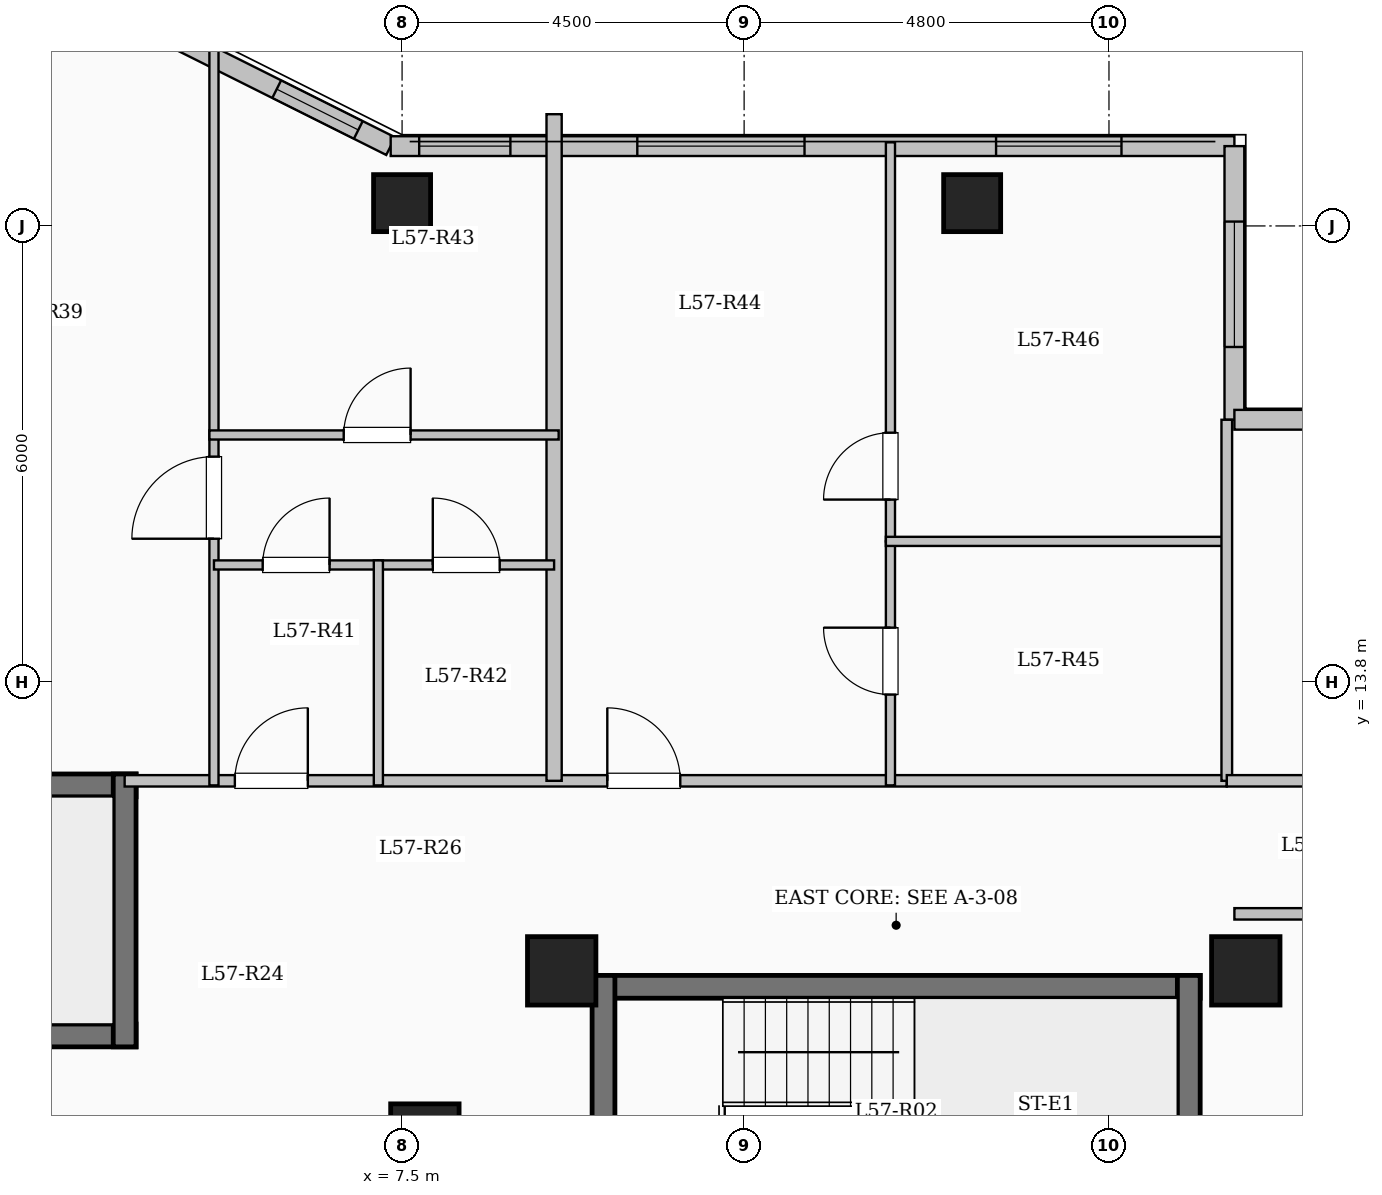
"""IFC4 building model, lengths in metres.
Left out: names, types, materials, properties, quantities, classifications, styles, units other than length and angle.
Written with IfcOpenShell. Run it as: python <this file> out.ifc"""

import sys

from ifc_helpers import new_model, si_unit, direction, frame, frame_2d, origin, origin_2d, place, context, subcontext, project, spatial, rectangle, extrude, element, fill, save


model = new_model("IFC4")
c1 = context("Model", 3, precision=1e-05, world=origin(), true_north=direction((0.0, 1.0)))
c2 = subcontext(c1, "Body", "Model", "MODEL_VIEW")
j1 = project(units=[si_unit("LENGTHUNIT", "METRE"), si_unit("PLANEANGLEUNIT", "RADIAN")], contexts=[c1])
p1 = place(None, origin())
s1 = spatial("IfcSite", under=j1, at=p1, CompositionType="ELEMENT")
p2 = place(p1, origin())
s2 = spatial("IfcBuilding", under=s1, at=p2, CompositionType="ELEMENT")
p3 = place(p2, frame((0.0, 0.0, 210.35)))
s3 = spatial("IfcBuildingStorey", under=s2, at=p3, CompositionType="ELEMENT", Elevation=210.35)
for number, where, z_axis, x_axis in (
    (1, (7.8, 7.8, 0.0), (0.0, 0.0, 1.0), (1.0, 0.0, 0.0)),
    (2, (9.6, 10.0, 0.0), (0.0, 0.0, 1.0), (1.0, 0.0, 0.0)),
    (3, (18.6, 10.0, 0.0), (0.0, 0.0, 1.0), (1.0, 0.0, 0.0)),
):
    element("IfcColumn", number, at=place(p3, frame(where, z_axis=z_axis, x_axis=x_axis)), inside=s3, PredefinedType="COLUMN", context=c2, shape_type="SweptSolid", body=[
        extrude(rectangle(XDim=0.9, YDim=0.9, at=origin_2d()), origin(), (0.0, 0.0, 1.0), 3.35),
    ])
for number, where, z_axis, x_axis in (
    (4, (7.5, 20.1, 0.0), (0.0, 0.0, 1.0), (1.0, 0.0, 0.0)),
    (5, (15.0, 20.1, 0.0), (0.0, 0.0, 1.0), (1.0, 0.0, 0.0)),
):
    element("IfcColumn", number, at=place(p3, frame(where, z_axis=z_axis, x_axis=x_axis)), inside=s3, PredefinedType="COLUMN", context=c2, shape_type="SweptSolid", body=[
        extrude(rectangle(XDim=0.75, YDim=0.75, at=origin_2d()), origin(), (0.0, 0.0, 1.0), 3.35),
    ])
p4 = place(p3, frame((4.35, 22.35, 0.0), z_axis=(0.0, 0.0, 1.0), x_axis=(0.894427191, -0.4472135955, 0.0)))
e6 = element("IfcWall", 6, at=p4, inside=s3, PredefinedType="SOLIDWALL", context=c2, shape_type="SweptSolid", body=[
    extrude(rectangle(XDim=3.354, YDim=0.26, at=frame_2d((1.677, 0.0))), origin(), (0.0, 0.0, 1.0), 3.1),
])
p5 = place(p4, frame((1.678, 0.0, 0.95)))
e7 = element("IfcOpeningElement", 7, at=p5, cuts=e6, PredefinedType="OPENING", context=c2, shape_type="SweptSolid", body=[
    extrude(rectangle(XDim=1.2, YDim=1.5, at=frame_2d((0.6, 0.75))), frame((0.0, 0.14, 0.0), z_axis=(0.0, -1.0, 0.0), x_axis=(1.0, 0.0, 0.0)), (0.0, 0.0, 1.0), 0.28),
])
p6 = place(p3, frame((7.35, 20.85, 0.0), z_axis=(0.0, 0.0, 1.0), x_axis=(1.0, 0.0, 0.0)))
e8 = element("IfcWall", 8, at=p6, inside=s3, PredefinedType="SOLIDWALL", context=c2, shape_type="SweptSolid", body=[
    extrude(rectangle(XDim=11.1, YDim=0.26, at=frame_2d((5.55, 0.0))), origin(), (0.0, 0.0, 1.0), 3.1),
])
p7 = place(p6, frame((0.375, 0.0, 0.95)))
e9 = element("IfcOpeningElement", 9, at=p7, cuts=e8, PredefinedType="OPENING", context=c2, shape_type="SweptSolid", body=[
    extrude(rectangle(XDim=1.2, YDim=1.5, at=frame_2d((0.6, 0.75))), frame((0.0, 0.14, 0.0), z_axis=(0.0, -1.0, 0.0), x_axis=(1.0, 0.0, 0.0)), (0.0, 0.0, 1.0), 0.28),
])
p8 = place(p6, frame((3.245, 0.0, 0.9)))
e10 = element("IfcOpeningElement", 10, at=p8, cuts=e8, PredefinedType="OPENING", context=c2, shape_type="SweptSolid", body=[
    extrude(rectangle(XDim=2.2, YDim=1.75, at=frame_2d((1.1, 0.875))), frame((0.0, 0.14, 0.0), z_axis=(0.0, -1.0, 0.0), x_axis=(1.0, 0.0, 0.0)), (0.0, 0.0, 1.0), 0.28),
])
p9 = place(p6, frame((7.965, 0.0, 0.9)))
e11 = element("IfcOpeningElement", 11, at=p9, cuts=e8, PredefinedType="OPENING", context=c2, shape_type="SweptSolid", body=[
    extrude(rectangle(XDim=1.65, YDim=1.6, at=frame_2d((0.825, 0.8))), frame((0.0, 0.14, 0.0), z_axis=(0.0, -1.0, 0.0), x_axis=(1.0, 0.0, 0.0)), (0.0, 0.0, 1.0), 0.28),
])
p10 = place(p3, frame((18.45, 20.85, 0.0), z_axis=(0.0, 0.0, 1.0), x_axis=(0.0, -1.0, 0.0)))
e12 = element("IfcWall", 12, at=p10, inside=s3, PredefinedType="SOLIDWALL", context=c2, shape_type="SweptSolid", body=[
    extrude(rectangle(XDim=3.6, YDim=0.26, at=frame_2d((1.8, 0.0))), origin(), (0.0, 0.0, 1.0), 3.1),
])
p11 = place(p10, frame((0.992, 0.0, 0.9)))
e13 = element("IfcOpeningElement", 13, at=p11, cuts=e12, PredefinedType="OPENING", context=c2, shape_type="SweptSolid", body=[
    extrude(rectangle(XDim=1.65, YDim=1.6, at=frame_2d((0.825, 0.8))), frame((0.0, 0.14, 0.0), z_axis=(0.0, -1.0, 0.0), x_axis=(1.0, 0.0, 0.0)), (0.0, 0.0, 1.0), 0.28),
])
p12 = place(p3, frame((18.45, 17.25, 0.0), z_axis=(0.0, 0.0, 1.0), x_axis=(1.0, 0.0, 0.0)))
e14 = element("IfcWall", 14, at=p12, inside=s3, PredefinedType="SOLIDWALL", context=c2, shape_type="SweptSolid", body=[
    extrude(rectangle(XDim=5.1, YDim=0.26, at=frame_2d((2.55, 0.0))), origin(), (0.0, 0.0, 1.0), 3.1),
])
p13 = place(p12, frame((1.525, 0.0, 0.9)))
e15 = element("IfcOpeningElement", 15, at=p13, cuts=e14, PredefinedType="OPENING", context=c2, shape_type="SweptSolid", body=[
    extrude(rectangle(XDim=2.0, YDim=1.7, at=frame_2d((1.0, 0.85))), frame((0.0, 0.14, 0.0), z_axis=(0.0, -1.0, 0.0), x_axis=(1.0, 0.0, 0.0)), (0.0, 0.0, 1.0), 0.28),
])
p14 = place(p3, frame((10.0, 9.79, 0.0), z_axis=(0.0, 0.0, 1.0), x_axis=(1.0, 0.0, 0.0)))
e16 = element("IfcWall", 16, at=p14, inside=s3, PredefinedType="SHEAR", context=c2, shape_type="SweptSolid", body=[
    extrude(rectangle(XDim=8.0, YDim=0.3, at=frame_2d((4.0, 0.0))), origin(), (0.0, 0.0, 1.0), 3.35),
])
for number, where, z_axis, x_axis in (
    (17, (10.15, 6.35, 0.0), (0.0, 0.0, 1.0), (0.0, 1.0, 0.0)),
    (18, (17.85, 6.35, 0.0), (0.0, 0.0, 1.0), (0.0, 1.0, 0.0)),
):
    element("IfcWall", number, at=place(p3, frame(where, z_axis=z_axis, x_axis=x_axis)), inside=s3, PredefinedType="SHEAR", context=c2, shape_type="SweptSolid", body=[
        extrude(rectangle(XDim=3.59, YDim=0.3, at=frame_2d((1.795, 0.0))), origin(), (0.0, 0.0, 1.0), 3.35),
    ])
p15 = place(p3, frame((-4.0, 12.44, 0.0), z_axis=(0.0, 0.0, 1.0), x_axis=(1.0, 0.0, 0.0)))
e19 = element("IfcWall", 19, at=p15, inside=s3, PredefinedType="SHEAR", context=c2, shape_type="SweptSolid", body=[
    extrude(rectangle(XDim=8.0, YDim=0.3, at=frame_2d((4.0, 0.0))), origin(), (0.0, 0.0, 1.0), 3.35),
])
p16 = place(p3, frame((-4.0, 9.15, 0.0), z_axis=(0.0, 0.0, 1.0), x_axis=(1.0, 0.0, 0.0)))
e20 = element("IfcWall", 20, at=p16, inside=s3, PredefinedType="SHEAR", context=c2, shape_type="SweptSolid", body=[
    extrude(rectangle(XDim=8.0, YDim=0.3, at=frame_2d((4.0, 0.0))), origin(), (0.0, 0.0, 1.0), 3.35),
])
p17 = place(p16, frame((0.55, 0.0, 0.0)))
e21 = element("IfcOpeningElement", 21, at=p17, cuts=e20, PredefinedType="OPENING", context=c2, shape_type="SweptSolid", body=[
    extrude(rectangle(XDim=1.0, YDim=2.15, at=frame_2d((0.5, 1.075))), frame((0.0, 0.16, 0.0), z_axis=(0.0, -1.0, 0.0), x_axis=(1.0, 0.0, 0.0)), (0.0, 0.0, 1.0), 0.32),
])
p18 = place(p3, frame((3.85, 9.0, 0.0), z_axis=(0.0, 0.0, 1.0), x_axis=(0.0, 1.0, 0.0)))
e22 = element("IfcWall", 22, at=p18, inside=s3, PredefinedType="SHEAR", context=c2, shape_type="SweptSolid", body=[
    extrude(rectangle(XDim=3.59, YDim=0.3, at=frame_2d((1.795, 0.0))), origin(), (0.0, 0.0, 1.0), 3.35),
])
p19 = place(p3, frame((3.85, 12.5, 0.0), z_axis=(0.0, 0.0, 1.0), x_axis=(1.0, 0.0, 0.0)))
e23 = element("IfcWall", 23, at=p19, inside=s3, PredefinedType="PARTITIONING", context=c2, shape_type="SweptSolid", body=[
    extrude(rectangle(XDim=14.5, YDim=0.15, at=frame_2d((7.25, 0.0))), origin(), (0.0, 0.0, 1.0), 3.1),
])
p20 = place(p19, frame((1.45, 0.0, 0.0)))
e24 = element("IfcOpeningElement", 24, at=p20, cuts=e23, PredefinedType="OPENING", context=c2, shape_type="SweptSolid", body=[
    extrude(rectangle(XDim=0.96, YDim=2.15, at=frame_2d((0.48, 1.075))), frame((0.0, 0.085, 0.0), z_axis=(0.0, -1.0, 0.0), x_axis=(1.0, 0.0, 0.0)), (0.0, 0.0, 1.0), 0.17),
])
p21 = place(p19, frame((6.35, 0.0, 0.0)))
e25 = element("IfcOpeningElement", 25, at=p21, cuts=e23, PredefinedType="OPENING", context=c2, shape_type="SweptSolid", body=[
    extrude(rectangle(XDim=0.96, YDim=2.15, at=frame_2d((0.48, 1.075))), frame((0.0, 0.085, 0.0), z_axis=(0.0, -1.0, 0.0), x_axis=(1.0, 0.0, 0.0)), (0.0, 0.0, 1.0), 0.17),
])
p22 = place(p3, frame((9.5, 12.5, 0.0), z_axis=(0.0, 0.0, 1.0), x_axis=(0.0, 1.0, 0.0)))
e26 = element("IfcWall", 26, at=p22, inside=s3, PredefinedType="SOLIDWALL", context=c2, shape_type="SweptSolid", body=[
    extrude(rectangle(XDim=8.77, YDim=0.2, at=frame_2d((4.385, 0.0))), origin(), (0.0, 0.0, 1.0), 3.1),
])
p23 = place(p3, frame((5.025, 12.44, 0.0), z_axis=(0.0, 0.0, 1.0), x_axis=(0.0, 1.0, 0.0)))
e27 = element("IfcWall", 27, at=p23, inside=s3, PredefinedType="PARTITIONING", context=c2, shape_type="SweptSolid", body=[
    extrude(rectangle(XDim=9.934, YDim=0.12, at=frame_2d((4.967, 0.0))), origin(), (0.0, 0.0, 1.0), 3.1),
])
p24 = place(p23, frame((3.245, 0.0, 0.0)))
e28 = element("IfcOpeningElement", 28, at=p24, cuts=e27, PredefinedType="OPENING", context=c2, shape_type="SweptSolid", body=[
    extrude(rectangle(XDim=1.08, YDim=2.15, at=frame_2d((0.54, 1.075))), frame((0.0, 0.07, 0.0), z_axis=(0.0, -1.0, 0.0), x_axis=(1.0, 0.0, 0.0)), (0.0, 0.0, 1.0), 0.14),
])
p25 = place(p3, frame((5.025, 15.34, 0.0), z_axis=(0.0, 0.0, 1.0), x_axis=(1.0, 0.0, 0.0)))
e29 = element("IfcWall", 29, at=p25, inside=s3, PredefinedType="PARTITIONING", context=c2, shape_type="SweptSolid", body=[
    extrude(rectangle(XDim=2.163, YDim=0.12, at=frame_2d((1.082, 0.0))), origin(), (0.0, 0.0, 1.0), 2.725),
])
p26 = place(p25, frame((0.641, 0.0, 0.0)))
e30 = element("IfcOpeningElement", 30, at=p26, cuts=e29, PredefinedType="OPENING", context=c2, shape_type="SweptSolid", body=[
    extrude(rectangle(XDim=0.88, YDim=2.1, at=frame_2d((0.44, 1.05))), frame((0.0, 0.07, 0.0), z_axis=(0.0, -1.0, 0.0), x_axis=(1.0, 0.0, 0.0)), (0.0, 0.0, 1.0), 0.14),
])
p27 = place(p3, frame((7.188, 15.34, 0.0), z_axis=(0.0, 0.0, 1.0), x_axis=(1.0, 0.0, 0.0)))
e31 = element("IfcWall", 31, at=p27, inside=s3, PredefinedType="PARTITIONING", context=c2, shape_type="SweptSolid", body=[
    extrude(rectangle(XDim=2.312, YDim=0.12, at=frame_2d((1.156, 0.0))), origin(), (0.0, 0.0, 1.0), 2.725),
])
p28 = place(p27, frame((0.716, 0.0, 0.0)))
e32 = element("IfcOpeningElement", 32, at=p28, cuts=e31, PredefinedType="OPENING", context=c2, shape_type="SweptSolid", body=[
    extrude(rectangle(XDim=0.88, YDim=2.1, at=frame_2d((0.44, 1.05))), frame((0.0, 0.07, 0.0), z_axis=(0.0, -1.0, 0.0), x_axis=(1.0, 0.0, 0.0)), (0.0, 0.0, 1.0), 0.14),
])
p29 = place(p3, frame((4.965, 17.05, 0.0), z_axis=(0.0, 0.0, 1.0), x_axis=(1.0, 0.0, 0.0)))
e33 = element("IfcWall", 33, at=p29, inside=s3, PredefinedType="PARTITIONING", context=c2, shape_type="SweptSolid", body=[
    extrude(rectangle(XDim=4.595, YDim=0.12, at=frame_2d((2.297, 0.0))), origin(), (0.0, 0.0, 1.0), 2.725),
])
p30 = place(p29, frame((1.767, 0.0, 0.0)))
e34 = element("IfcOpeningElement", 34, at=p30, cuts=e33, PredefinedType="OPENING", context=c2, shape_type="SweptSolid", body=[
    extrude(rectangle(XDim=0.88, YDim=2.1, at=frame_2d((0.44, 1.05))), frame((0.0, 0.07, 0.0), z_axis=(0.0, -1.0, 0.0), x_axis=(1.0, 0.0, 0.0)), (0.0, 0.0, 1.0), 0.14),
])
p31 = place(p3, frame((7.188, 12.44, 0.0), z_axis=(0.0, 0.0, 1.0), x_axis=(0.0, 1.0, 0.0)))
e35 = element("IfcWall", 35, at=p31, inside=s3, PredefinedType="PARTITIONING", context=c2, shape_type="SweptSolid", body=[
    extrude(rectangle(XDim=2.96, YDim=0.12, at=frame_2d((1.48, 0.0))), origin(), (0.0, 0.0, 1.0), 2.585),
])
p32 = place(p3, frame((13.925, 12.44, 0.0), z_axis=(0.0, 0.0, 1.0), x_axis=(0.0, 1.0, 0.0)))
e36 = element("IfcWall", 36, at=p32, inside=s3, PredefinedType="PARTITIONING", context=c2, shape_type="SweptSolid", body=[
    extrude(rectangle(XDim=3.21, YDim=0.12, at=frame_2d((1.605, 0.0))), origin(), (0.0, 0.0, 1.0), 3.1),
])
p33 = place(p32, frame((1.195, 0.0, 0.0)))
e37 = element("IfcOpeningElement", 37, at=p33, cuts=e36, PredefinedType="OPENING", context=c2, shape_type="SweptSolid", body=[
    extrude(rectangle(XDim=0.88, YDim=2.1, at=frame_2d((0.44, 1.05))), frame((0.0, 0.07, 0.0), z_axis=(0.0, -1.0, 0.0), x_axis=(1.0, 0.0, 0.0)), (0.0, 0.0, 1.0), 0.14),
])
p34 = place(p3, frame((13.925, 15.65, 0.0), z_axis=(0.0, 0.0, 1.0), x_axis=(0.0, 1.0, 0.0)))
e38 = element("IfcWall", 38, at=p34, inside=s3, PredefinedType="PARTITIONING", context=c2, shape_type="SweptSolid", body=[
    extrude(rectangle(XDim=5.25, YDim=0.12, at=frame_2d((2.625, 0.0))), origin(), (0.0, 0.0, 1.0), 3.1),
])
p35 = place(p34, frame((0.55, 0.0, 0.0)))
e39 = element("IfcOpeningElement", 39, at=p35, cuts=e38, PredefinedType="OPENING", context=c2, shape_type="SweptSolid", body=[
    extrude(rectangle(XDim=0.88, YDim=2.1, at=frame_2d((0.44, 1.05))), frame((0.0, 0.07, 0.0), z_axis=(0.0, -1.0, 0.0), x_axis=(1.0, 0.0, 0.0)), (0.0, 0.0, 1.0), 0.14),
])
p36 = place(p3, frame((13.865, 15.65, 0.0), z_axis=(0.0, 0.0, 1.0), x_axis=(1.0, 0.0, 0.0)))
e40 = element("IfcWall", 40, at=p36, inside=s3, PredefinedType="PARTITIONING", context=c2, shape_type="SweptSolid", body=[
    extrude(rectangle(XDim=4.545, YDim=0.12, at=frame_2d((2.272, 0.0))), origin(), (0.0, 0.0, 1.0), 2.725),
])
p37 = place(p3, frame((18.45, 10.75, 0.0), z_axis=(0.0, 0.0, 1.0), x_axis=(1.0, 0.0, 0.0)))
e41 = element("IfcWall", 41, at=p37, inside=s3, PredefinedType="PARTITIONING", context=c2, shape_type="SweptSolid", body=[
    extrude(rectangle(XDim=5.13, YDim=0.15, at=frame_2d((2.565, 0.0))), origin(), (0.0, 0.0, 1.0), 3.1),
])
p38 = place(p3, frame((18.35, 12.5, 0.0), z_axis=(0.0, 0.0, 1.0), x_axis=(0.0, 1.0, 0.0)))
e42 = element("IfcWall", 42, at=p38, inside=s3, PredefinedType="PARTITIONING", context=c2, shape_type="SweptSolid", body=[
    extrude(rectangle(XDim=4.75, YDim=0.14, at=frame_2d((2.375, 0.0))), origin(), (0.0, 0.0, 1.0), 3.1),
])
p39 = place(p3, frame((18.35, 12.5, 0.0), z_axis=(0.0, 0.0, 1.0), x_axis=(1.0, 0.0, 0.0)))
e43 = element("IfcWall", 43, at=p39, inside=s3, PredefinedType="PARTITIONING", context=c2, shape_type="SweptSolid", body=[
    extrude(rectangle(XDim=5.23, YDim=0.15, at=frame_2d((2.615, 0.0))), origin(), (0.0, 0.0, 1.0), 3.1),
])
p40 = place(p39, frame((2.14, 0.0, 0.0)))
e44 = element("IfcOpeningElement", 44, at=p40, cuts=e43, PredefinedType="OPENING", context=c2, shape_type="SweptSolid", body=[
    extrude(rectangle(XDim=0.95, YDim=2.15, at=frame_2d((0.475, 1.075))), frame((0.0, 0.085, 0.0), z_axis=(0.0, -1.0, 0.0), x_axis=(1.0, 0.0, 0.0)), (0.0, 0.0, 1.0), 0.17),
])
p41 = place(p5, origin())
e45 = element("IfcWindow", 45, at=p41, inside=s3, PartitioningType="SINGLE_PANEL", PredefinedType="WINDOW", context=c2, shape_type="SweptSolid", body=[
    extrude(rectangle(XDim=1.2, YDim=1.5, at=frame_2d((0.6, 0.75))), frame((0.0, 0.03, 0.0), z_axis=(0.0, -1.0, 0.0), x_axis=(1.0, 0.0, 0.0)), (0.0, 0.0, 1.0), 0.06),
])
fill(e7, e45)
p42 = place(p7, origin())
e46 = element("IfcWindow", 46, at=p42, inside=s3, PartitioningType="SINGLE_PANEL", PredefinedType="WINDOW", context=c2, shape_type="SweptSolid", body=[
    extrude(rectangle(XDim=1.2, YDim=1.5, at=frame_2d((0.6, 0.75))), frame((0.0, 0.03, 0.0), z_axis=(0.0, -1.0, 0.0), x_axis=(1.0, 0.0, 0.0)), (0.0, 0.0, 1.0), 0.06),
])
fill(e9, e46)
p43 = place(p8, origin())
e47 = element("IfcWindow", 47, at=p43, inside=s3, PartitioningType="SINGLE_PANEL", PredefinedType="WINDOW", context=c2, shape_type="SweptSolid", body=[
    extrude(rectangle(XDim=2.2, YDim=1.75, at=frame_2d((1.1, 0.875))), frame((0.0, 0.03, 0.0), z_axis=(0.0, -1.0, 0.0), x_axis=(1.0, 0.0, 0.0)), (0.0, 0.0, 1.0), 0.06),
])
fill(e10, e47)
p44 = place(p9, origin())
e48 = element("IfcWindow", 48, at=p44, inside=s3, PartitioningType="SINGLE_PANEL", PredefinedType="WINDOW", context=c2, shape_type="SweptSolid", body=[
    extrude(rectangle(XDim=1.65, YDim=1.6, at=frame_2d((0.825, 0.8))), frame((0.0, 0.03, 0.0), z_axis=(0.0, -1.0, 0.0), x_axis=(1.0, 0.0, 0.0)), (0.0, 0.0, 1.0), 0.06),
])
fill(e11, e48)
p45 = place(p11, origin())
e49 = element("IfcWindow", 49, at=p45, inside=s3, PartitioningType="SINGLE_PANEL", PredefinedType="WINDOW", context=c2, shape_type="SweptSolid", body=[
    extrude(rectangle(XDim=1.65, YDim=1.6, at=frame_2d((0.825, 0.8))), frame((0.0, 0.03, 0.0), z_axis=(0.0, -1.0, 0.0), x_axis=(1.0, 0.0, 0.0)), (0.0, 0.0, 1.0), 0.06),
])
fill(e13, e49)
p46 = place(p20, origin())
e50 = element("IfcDoor", 50, at=p46, inside=s3, OperationType="SINGLE_SWING_RIGHT", PredefinedType="DOOR", context=c2, shape_type="SweptSolid", body=[
    extrude(rectangle(XDim=0.96, YDim=2.15, at=frame_2d((0.48, 1.075))), frame((0.0, 0.025, 0.0), z_axis=(0.0, -1.0, 0.0), x_axis=(1.0, 0.0, 0.0)), (0.0, 0.0, 1.0), 0.05),
])
fill(e24, e50)
p47 = place(p24, origin())
e51 = element("IfcDoor", 51, at=p47, inside=s3, OperationType="SINGLE_SWING_LEFT", PredefinedType="DOOR", context=c2, shape_type="SweptSolid", body=[
    extrude(rectangle(XDim=1.08, YDim=2.15, at=frame_2d((0.54, 1.075))), frame((0.0, 0.025, 0.0), z_axis=(0.0, -1.0, 0.0), x_axis=(1.0, 0.0, 0.0)), (0.0, 0.0, 1.0), 0.05),
])
fill(e28, e51)
p48 = place(p26, origin())
e52 = element("IfcDoor", 52, at=p48, inside=s3, OperationType="SINGLE_SWING_RIGHT", PredefinedType="DOOR", context=c2, shape_type="SweptSolid", body=[
    extrude(rectangle(XDim=0.88, YDim=2.1, at=frame_2d((0.44, 1.05))), frame((0.0, 0.025, 0.0), z_axis=(0.0, -1.0, 0.0), x_axis=(1.0, 0.0, 0.0)), (0.0, 0.0, 1.0), 0.05),
])
fill(e30, e52)
p49 = place(p28, origin())
e53 = element("IfcDoor", 53, at=p49, inside=s3, OperationType="SINGLE_SWING_LEFT", PredefinedType="DOOR", context=c2, shape_type="SweptSolid", body=[
    extrude(rectangle(XDim=0.88, YDim=2.1, at=frame_2d((0.44, 1.05))), frame((0.0, 0.025, 0.0), z_axis=(0.0, -1.0, 0.0), x_axis=(1.0, 0.0, 0.0)), (0.0, 0.0, 1.0), 0.05),
])
fill(e32, e53)
p50 = place(p30, origin())
e54 = element("IfcDoor", 54, at=p50, inside=s3, OperationType="SINGLE_SWING_RIGHT", PredefinedType="DOOR", context=c2, shape_type="SweptSolid", body=[
    extrude(rectangle(XDim=0.88, YDim=2.1, at=frame_2d((0.44, 1.05))), frame((0.0, 0.025, 0.0), z_axis=(0.0, -1.0, 0.0), x_axis=(1.0, 0.0, 0.0)), (0.0, 0.0, 1.0), 0.05),
])
fill(e34, e54)
p51 = place(p21, origin())
e55 = element("IfcDoor", 55, at=p51, inside=s3, OperationType="SINGLE_SWING_LEFT", PredefinedType="DOOR", context=c2, shape_type="SweptSolid", body=[
    extrude(rectangle(XDim=0.96, YDim=2.15, at=frame_2d((0.48, 1.075))), frame((0.0, 0.025, 0.0), z_axis=(0.0, -1.0, 0.0), x_axis=(1.0, 0.0, 0.0)), (0.0, 0.0, 1.0), 0.05),
])
fill(e25, e55)
p52 = place(p33, origin())
e56 = element("IfcDoor", 56, at=p52, inside=s3, OperationType="SINGLE_SWING_RIGHT", PredefinedType="DOOR", context=c2, shape_type="SweptSolid", body=[
    extrude(rectangle(XDim=0.88, YDim=2.1, at=frame_2d((0.44, 1.05))), frame((0.0, 0.025, 0.0), z_axis=(0.0, -1.0, 0.0), x_axis=(1.0, 0.0, 0.0)), (0.0, 0.0, 1.0), 0.05),
])
fill(e37, e56)
p53 = place(p35, origin())
e57 = element("IfcDoor", 57, at=p53, inside=s3, OperationType="SINGLE_SWING_LEFT", PredefinedType="DOOR", context=c2, shape_type="SweptSolid", body=[
    extrude(rectangle(XDim=0.88, YDim=2.1, at=frame_2d((0.44, 1.05))), frame((0.0, 0.025, 0.0), z_axis=(0.0, -1.0, 0.0), x_axis=(1.0, 0.0, 0.0)), (0.0, 0.0, 1.0), 0.05),
])
fill(e39, e57)
save(model, sys.argv[1])
